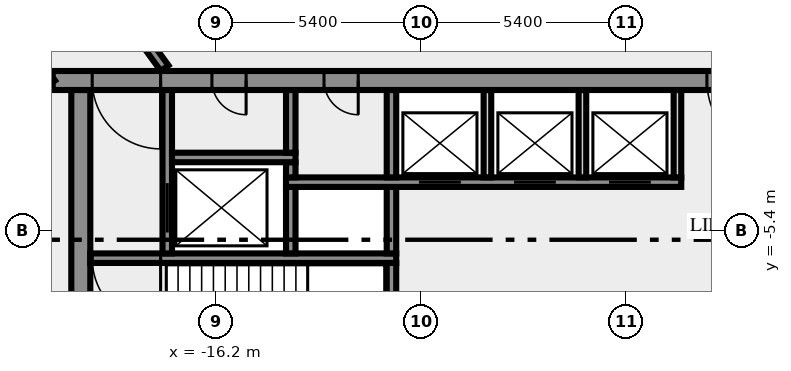
"""IFC4 building model, lengths in metres.
Left out: names, types, materials, properties, quantities, classifications, styles, units other than length and angle.
Written with IfcOpenShell. Run it as: python <this file> out.ifc"""

import sys

from ifc_helpers import new_model, si_unit, direction, frame, frame_2d, origin, place, context, subcontext, project, spatial, rectangle, extrude, element, fill, save


model = new_model("IFC4")
c1 = context("Model", 3, precision=1e-05, world=origin(), true_north=direction((0.0, 1.0)))
c2 = subcontext(c1, "Body", "Model", "MODEL_VIEW")
j1 = project(units=[si_unit("LENGTHUNIT", "METRE"), si_unit("PLANEANGLEUNIT", "RADIAN")], contexts=[c1])
p1 = place(None, origin())
s1 = spatial("IfcSite", under=j1, at=p1, CompositionType="ELEMENT")
p2 = place(p1, origin())
s2 = spatial("IfcBuilding", under=s1, at=p2, CompositionType="ELEMENT")
p3 = place(p2, frame((0.0, 0.0, 89.0)))
s3 = spatial("IfcBuildingStorey", under=s2, at=p3, CompositionType="ELEMENT", Elevation=89.0)
p4 = place(p3, frame((-19.75, -10.5, 0.0), z_axis=(0.0, 0.0, 1.0), x_axis=(0.0, 1.0, 0.0)))
e1 = element("IfcWall", 1, at=p4, inside=s3, PredefinedType="SHEAR", context=c2, shape_type="SweptSolid", body=[
    extrude(rectangle(XDim=8.8, YDim=0.5, at=frame_2d((4.4, 0.0))), origin(), (0.0, 0.0, 1.0), 3.65),
])
p5 = place(p3, frame((-11.575, -7.25, 0.0), z_axis=(0.0, 0.0, 1.0), x_axis=(0.0, 1.0, 0.0)))
e2 = element("IfcWall", 2, at=p5, inside=s3, PredefinedType="SHEAR", context=c2, shape_type="SweptSolid", body=[
    extrude(rectangle(XDim=1.0, YDim=0.25, at=frame_2d((0.5, 0.0))), origin(), (0.0, 0.0, 1.0), 3.65),
])
p6 = place(p3, frame((-11.45, -6.125, 0.0), z_axis=(0.0, 0.0, 1.0), x_axis=(-1.0, 0.0, 0.0)))
e3 = element("IfcWall", 3, at=p6, inside=s3, PredefinedType="SHEAR", context=c2, shape_type="SweptSolid", body=[
    extrude(rectangle(XDim=8.05, YDim=0.25, at=frame_2d((4.025, 0.0))), origin(), (0.0, 0.0, 1.0), 3.65),
])
p7 = place(p6, frame((6.2, 0.0, 0.0)))
e4 = element("IfcOpeningElement", 4, at=p7, cuts=e3, PredefinedType="OPENING", context=c2, shape_type="SweptSolid", body=[
    extrude(rectangle(XDim=1.8, YDim=2.1, at=frame_2d((0.9, 1.05))), frame((0.0, 0.135, 0.0), z_axis=(0.0, -1.0, 0.0), x_axis=(1.0, 0.0, 0.0)), (0.0, 0.0, 1.0), 0.27),
])
p8 = place(p3, frame((-17.475, -6.0, 0.0), z_axis=(0.0, 0.0, 1.0), x_axis=(0.0, 1.0, 0.0)))
e5 = element("IfcWall", 5, at=p8, inside=s3, PredefinedType="SHEAR", context=c2, shape_type="SweptSolid", body=[
    extrude(rectangle(XDim=4.3, YDim=0.25, at=frame_2d((2.15, 0.0))), origin(), (0.0, 0.0, 1.0), 3.65),
])
p9 = place(p8, frame((0.55, 0.0, 0.0)))
e6 = element("IfcOpeningElement", 6, at=p9, cuts=e5, PredefinedType="OPENING", context=c2, shape_type="SweptSolid", body=[
    extrude(rectangle(XDim=1.3, YDim=2.1, at=frame_2d((0.65, 1.05))), frame((0.0, 0.135, 0.0), z_axis=(0.0, -1.0, 0.0), x_axis=(1.0, 0.0, 0.0)), (0.0, 0.0, 1.0), 0.27),
])
for number, where, z_axis, x_axis in (
    (7, (-14.225, -6.0, 0.0), (0.0, 0.0, 1.0), (0.0, 1.0, 0.0)),
    (8, (-11.575, -6.0, 0.0), (0.0, 0.0, 1.0), (0.0, 1.0, 0.0)),
):
    element("IfcWall", number, at=place(p3, frame(where, z_axis=z_axis, x_axis=x_axis)), inside=s3, PredefinedType="SHEAR", context=c2, shape_type="SweptSolid", body=[
        extrude(rectangle(XDim=1.75, YDim=0.25, at=frame_2d((0.875, 0.0))), origin(), (0.0, 0.0, 1.0), 3.65),
    ])
p10 = place(p3, frame((-14.35, -4.125, 0.0), z_axis=(0.0, 0.0, 1.0), x_axis=(1.0, 0.0, 0.0)))
e9 = element("IfcWall", 9, at=p10, inside=s3, PredefinedType="SHEAR", context=c2, shape_type="SweptSolid", body=[
    extrude(rectangle(XDim=10.4, YDim=0.25, at=frame_2d((5.2, 0.0))), origin(), (0.0, 0.0, 1.0), 3.65),
])
p11 = place(p10, frame((3.5, 0.0, 0.0)))
e10 = element("IfcOpeningElement", 10, at=p11, cuts=e9, PredefinedType="OPENING", context=c2, shape_type="SweptSolid", body=[
    extrude(rectangle(XDim=1.1, YDim=2.1, at=frame_2d((0.55, 1.05))), frame((0.0, 0.135, 0.0), z_axis=(0.0, -1.0, 0.0), x_axis=(1.0, 0.0, 0.0)), (0.0, 0.0, 1.0), 0.27),
])
p12 = place(p10, frame((6.0, 0.0, 0.0)))
e11 = element("IfcOpeningElement", 11, at=p12, cuts=e9, PredefinedType="OPENING", context=c2, shape_type="SweptSolid", body=[
    extrude(rectangle(XDim=1.1, YDim=2.1, at=frame_2d((0.55, 1.05))), frame((0.0, 0.135, 0.0), z_axis=(0.0, -1.0, 0.0), x_axis=(1.0, 0.0, 0.0)), (0.0, 0.0, 1.0), 0.27),
])
p13 = place(p10, frame((8.5, 0.0, 0.0)))
e12 = element("IfcOpeningElement", 12, at=p13, cuts=e9, PredefinedType="OPENING", context=c2, shape_type="SweptSolid", body=[
    extrude(rectangle(XDim=1.1, YDim=2.1, at=frame_2d((0.55, 1.05))), frame((0.0, 0.135, 0.0), z_axis=(0.0, -1.0, 0.0), x_axis=(1.0, 0.0, 0.0)), (0.0, 0.0, 1.0), 0.27),
])
p14 = place(p3, frame((-14.225, -4.0, 0.0), z_axis=(0.0, 0.0, 1.0), x_axis=(0.0, 1.0, 0.0)))
e13 = element("IfcWall", 13, at=p14, inside=s3, PredefinedType="SHEAR", context=c2, shape_type="SweptSolid", body=[
    extrude(rectangle(XDim=0.4, YDim=0.25, at=frame_2d((0.2, 0.0))), origin(), (0.0, 0.0, 1.0), 3.65),
])
p15 = place(p3, frame((-11.575, -4.0, 0.0), z_axis=(0.0, 0.0, 1.0), x_axis=(0.0, 1.0, 0.0)))
e14 = element("IfcWall", 14, at=p15, inside=s3, PredefinedType="SHEAR", context=c2, shape_type="SweptSolid", body=[
    extrude(rectangle(XDim=2.3, YDim=0.25, at=frame_2d((1.15, 0.0))), origin(), (0.0, 0.0, 1.0), 3.65),
])
for number, where, z_axis, x_axis in (
    (15, (-9.05, -4.0, 0.0), (0.0, 0.0, 1.0), (0.0, 1.0, 0.0)),
    (16, (-6.55, -4.0, 0.0), (0.0, 0.0, 1.0), (0.0, 1.0, 0.0)),
    (17, (-4.05, -4.0, 0.0), (0.0, 0.0, 1.0), (0.0, 1.0, 0.0)),
):
    element("IfcWall", number, at=place(p3, frame(where, z_axis=z_axis, x_axis=x_axis)), inside=s3, PredefinedType="SOLIDWALL", context=c2, shape_type="SweptSolid", body=[
        extrude(rectangle(XDim=2.3, YDim=0.2, at=frame_2d((1.15, 0.0))), origin(), (0.0, 0.0, 1.0), 3.65),
    ])
p16 = place(p3, frame((-17.35, -3.475, 0.0), z_axis=(0.0, 0.0, 1.0), x_axis=(1.0, 0.0, 0.0)))
e18 = element("IfcWall", 18, at=p16, inside=s3, PredefinedType="SHEAR", context=c2, shape_type="SweptSolid", body=[
    extrude(rectangle(XDim=3.25, YDim=0.25, at=frame_2d((1.625, 0.0))), origin(), (0.0, 0.0, 1.0), 3.65),
])
p17 = place(p3, frame((-14.225, -3.35, 0.0), z_axis=(0.0, 0.0, 1.0), x_axis=(0.0, 1.0, 0.0)))
e19 = element("IfcWall", 19, at=p17, inside=s3, PredefinedType="SHEAR", context=c2, shape_type="SweptSolid", body=[
    extrude(rectangle(XDim=1.65, YDim=0.25, at=frame_2d((0.825, 0.0))), origin(), (0.0, 0.0, 1.0), 3.65),
])
p18 = place(p3, frame((20.49, -1.45, 0.0), z_axis=(0.0, 0.0, 1.0), x_axis=(-1.0, 0.0, 0.0)))
e20 = element("IfcWall", 20, at=p18, inside=s3, PredefinedType="SHEAR", context=c2, shape_type="SweptSolid", body=[
    extrude(rectangle(XDim=40.98, YDim=0.5, at=frame_2d((20.49, 0.0))), origin(), (0.0, 0.0, 1.0), 3.65),
])
p19 = place(p18, frame((38.14, 0.0, 0.0)))
e21 = element("IfcOpeningElement", 21, at=p19, cuts=e20, PredefinedType="OPENING", context=c2, shape_type="SweptSolid", body=[
    extrude(rectangle(XDim=1.8, YDim=2.1, at=frame_2d((0.9, 1.05))), frame((0.0, 0.26, 0.0), z_axis=(0.0, -1.0, 0.0), x_axis=(1.0, 0.0, 0.0)), (0.0, 0.0, 1.0), 0.52),
])
p20 = place(p18, frame((35.89, 0.0, 0.0)))
e22 = element("IfcOpeningElement", 22, at=p20, cuts=e20, PredefinedType="OPENING", context=c2, shape_type="SweptSolid", body=[
    extrude(rectangle(XDim=0.9, YDim=2.1, at=frame_2d((0.45, 1.05))), frame((0.0, 0.26, 0.0), z_axis=(0.0, -1.0, 0.0), x_axis=(1.0, 0.0, 0.0)), (0.0, 0.0, 1.0), 0.52),
])
p21 = place(p18, frame((32.94, 0.0, 0.0)))
e23 = element("IfcOpeningElement", 23, at=p21, cuts=e20, PredefinedType="OPENING", context=c2, shape_type="SweptSolid", body=[
    extrude(rectangle(XDim=0.9, YDim=2.1, at=frame_2d((0.45, 1.05))), frame((0.0, 0.26, 0.0), z_axis=(0.0, -1.0, 0.0), x_axis=(1.0, 0.0, 0.0)), (0.0, 0.0, 1.0), 0.52),
])
p22 = place(p18, frame((21.765, 0.0, 0.0)))
e24 = element("IfcOpeningElement", 24, at=p22, cuts=e20, PredefinedType="OPENING", context=c2, shape_type="SweptSolid", body=[
    extrude(rectangle(XDim=2.0, YDim=2.1, at=frame_2d((1.0, 1.05))), frame((0.0, 0.26, 0.0), z_axis=(0.0, -1.0, 0.0), x_axis=(1.0, 0.0, 0.0)), (0.0, 0.0, 1.0), 0.52),
])
p23 = place(p18, frame((7.14, 0.0, 0.0)))
e25 = element("IfcOpeningElement", 25, at=p23, cuts=e20, PredefinedType="OPENING", context=c2, shape_type="SweptSolid", body=[
    extrude(rectangle(XDim=0.9, YDim=2.1, at=frame_2d((0.45, 1.05))), frame((0.0, 0.26, 0.0), z_axis=(0.0, -1.0, 0.0), x_axis=(1.0, 0.0, 0.0)), (0.0, 0.0, 1.0), 0.52),
])
p24 = place(p18, frame((5.028, 0.0, 0.0)))
e26 = element("IfcOpeningElement", 26, at=p24, cuts=e20, PredefinedType="OPENING", context=c2, shape_type="SweptSolid", body=[
    extrude(rectangle(XDim=0.8, YDim=2.1, at=frame_2d((0.4, 1.05))), frame((0.0, 0.26, 0.0), z_axis=(0.0, -1.0, 0.0), x_axis=(1.0, 0.0, 0.0)), (0.0, 0.0, 1.0), 0.52),
])
p25 = place(p18, frame((3.452, 0.0, 0.0)))
e27 = element("IfcOpeningElement", 27, at=p25, cuts=e20, PredefinedType="OPENING", context=c2, shape_type="SweptSolid", body=[
    extrude(rectangle(XDim=0.8, YDim=2.1, at=frame_2d((0.4, 1.05))), frame((0.0, 0.26, 0.0), z_axis=(0.0, -1.0, 0.0), x_axis=(1.0, 0.0, 0.0)), (0.0, 0.0, 1.0), 0.52),
])
p26 = place(p18, frame((1.04, 0.0, 0.0)))
e28 = element("IfcOpeningElement", 28, at=p26, cuts=e20, PredefinedType="OPENING", context=c2, shape_type="SweptSolid", body=[
    extrude(rectangle(XDim=1.8, YDim=2.1, at=frame_2d((0.9, 1.05))), frame((0.0, 0.26, 0.0), z_axis=(0.0, -1.0, 0.0), x_axis=(1.0, 0.0, 0.0)), (0.0, 0.0, 1.0), 0.52),
])
p27 = place(p3, frame((-20.531, -1.523, 0.0), z_axis=(0.0, 0.0, 1.0), x_axis=(-0.587784522481, 0.809017524614, 0.0)))
e29 = element("IfcWall", 29, at=p27, inside=s3, PredefinedType="SOLIDWALL", context=c2, shape_type="SweptSolid", body=[
    extrude(rectangle(XDim=49.912, YDim=0.25, at=frame_2d((24.956, 0.0))), origin(), (0.0, 0.0, 1.0), 3.65),
])
p28 = place(p27, frame((0.533, 0.0, 0.0)))
e30 = element("IfcOpeningElement", 30, at=p28, cuts=e29, PredefinedType="OPENING", context=c2, shape_type="SweptSolid", body=[
    extrude(rectangle(XDim=0.9, YDim=2.1, at=frame_2d((0.45, 1.05))), frame((0.0, 0.135, 0.0), z_axis=(0.0, -1.0, 0.0), x_axis=(1.0, 0.0, 0.0)), (0.0, 0.0, 1.0), 0.27),
])
p29 = place(p27, frame((48.47, 0.0, 0.0)))
e31 = element("IfcOpeningElement", 31, at=p29, cuts=e29, PredefinedType="OPENING", context=c2, shape_type="SweptSolid", body=[
    extrude(rectangle(XDim=1.0, YDim=2.1, at=frame_2d((0.5, 1.05))), frame((0.0, 0.135, 0.0), z_axis=(0.0, -1.0, 0.0), x_axis=(1.0, 0.0, 0.0)), (0.0, 0.0, 1.0), 0.27),
])
p30 = place(p27, frame((17.365, 0.0, 0.0)))
e32 = element("IfcOpeningElement", 32, at=p30, cuts=e29, PredefinedType="OPENING", context=c2, shape_type="SweptSolid", body=[
    extrude(rectangle(XDim=1.8, YDim=2.1, at=frame_2d((0.9, 1.05))), frame((0.0, 0.135, 0.0), z_axis=(0.0, -1.0, 0.0), x_axis=(1.0, 0.0, 0.0)), (0.0, 0.0, 1.0), 0.27),
])
p31 = place(p27, frame((7.816, 0.0, 0.0)))
e33 = element("IfcOpeningElement", 33, at=p31, cuts=e29, PredefinedType="OPENING", context=c2, shape_type="SweptSolid", body=[
    extrude(rectangle(XDim=0.9, YDim=2.1, at=frame_2d((0.45, 1.05))), frame((0.0, 0.135, 0.0), z_axis=(0.0, -1.0, 0.0), x_axis=(1.0, 0.0, 0.0)), (0.0, 0.0, 1.0), 0.27),
])
p32 = place(p3, frame((-37.232, 25.972, 0.0), z_axis=(0.0, 0.0, 1.0), x_axis=(0.587786323093, -0.809016216391, 0.0)))
e34 = element("IfcWall", 34, at=p32, inside=s3, PredefinedType="SOLIDWALL", context=c2, shape_type="SweptSolid", body=[
    extrude(rectangle(XDim=33.493, YDim=0.25, at=frame_2d((16.747, 0.0))), origin(), (0.0, 0.0, 1.0), 3.65),
])
p33 = place(p32, frame((19.135, 0.0, 0.0)))
e35 = element("IfcOpeningElement", 35, at=p33, cuts=e34, PredefinedType="OPENING", context=c2, shape_type="SweptSolid", body=[
    extrude(rectangle(XDim=0.9, YDim=2.1, at=frame_2d((0.45, 1.05))), frame((0.0, 0.135, 0.0), z_axis=(0.0, -1.0, 0.0), x_axis=(1.0, 0.0, 0.0)), (0.0, 0.0, 1.0), 0.27),
])
p34 = place(p32, frame((7.137, 0.0, 0.0)))
e36 = element("IfcOpeningElement", 36, at=p34, cuts=e34, PredefinedType="OPENING", context=c2, shape_type="SweptSolid", body=[
    extrude(rectangle(XDim=1.8, YDim=2.1, at=frame_2d((0.9, 1.05))), frame((0.0, 0.135, 0.0), z_axis=(0.0, -1.0, 0.0), x_axis=(1.0, 0.0, 0.0)), (0.0, 0.0, 1.0), 0.27),
])
p35 = place(p32, frame((16.435, 0.0, 0.0)))
e37 = element("IfcOpeningElement", 37, at=p35, cuts=e34, PredefinedType="OPENING", context=c2, shape_type="SweptSolid", body=[
    extrude(rectangle(XDim=0.9, YDim=2.1, at=frame_2d((0.45, 1.05))), frame((0.0, 0.135, 0.0), z_axis=(0.0, -1.0, 0.0), x_axis=(1.0, 0.0, 0.0)), (0.0, 0.0, 1.0), 0.27),
])
p36 = place(p7, origin())
e38 = element("IfcDoor", 38, at=p36, inside=s3, OperationType="DOUBLE_DOOR_SINGLE_SWING", PredefinedType="DOOR", context=c2, shape_type="SweptSolid", body=[
    extrude(rectangle(XDim=1.8, YDim=2.1, at=frame_2d((0.9, 1.05))), frame((0.0, 0.025, 0.0), z_axis=(0.0, -1.0, 0.0), x_axis=(1.0, 0.0, 0.0)), (0.0, 0.0, 1.0), 0.05),
])
fill(e4, e38)
p37 = place(p9, origin())
e39 = element("IfcDoor", 39, at=p37, inside=s3, OperationType="DOUBLE_DOOR_SLIDING", PredefinedType="DOOR", context=c2, shape_type="SweptSolid", body=[
    extrude(rectangle(XDim=1.3, YDim=2.1, at=frame_2d((0.65, 1.05))), frame((0.0, 0.025, 0.0), z_axis=(0.0, -1.0, 0.0), x_axis=(1.0, 0.0, 0.0)), (0.0, 0.0, 1.0), 0.05),
])
fill(e6, e39)
p38 = place(p11, origin())
e40 = element("IfcDoor", 40, at=p38, inside=s3, OperationType="DOUBLE_DOOR_SLIDING", PredefinedType="DOOR", context=c2, shape_type="SweptSolid", body=[
    extrude(rectangle(XDim=1.1, YDim=2.1, at=frame_2d((0.55, 1.05))), frame((0.0, 0.025, 0.0), z_axis=(0.0, -1.0, 0.0), x_axis=(1.0, 0.0, 0.0)), (0.0, 0.0, 1.0), 0.05),
])
fill(e10, e40)
p39 = place(p12, origin())
e41 = element("IfcDoor", 41, at=p39, inside=s3, OperationType="DOUBLE_DOOR_SLIDING", PredefinedType="DOOR", context=c2, shape_type="SweptSolid", body=[
    extrude(rectangle(XDim=1.1, YDim=2.1, at=frame_2d((0.55, 1.05))), frame((0.0, 0.025, 0.0), z_axis=(0.0, -1.0, 0.0), x_axis=(1.0, 0.0, 0.0)), (0.0, 0.0, 1.0), 0.05),
])
fill(e11, e41)
p40 = place(p13, origin())
e42 = element("IfcDoor", 42, at=p40, inside=s3, OperationType="DOUBLE_DOOR_SLIDING", PredefinedType="DOOR", context=c2, shape_type="SweptSolid", body=[
    extrude(rectangle(XDim=1.1, YDim=2.1, at=frame_2d((0.55, 1.05))), frame((0.0, 0.025, 0.0), z_axis=(0.0, -1.0, 0.0), x_axis=(1.0, 0.0, 0.0)), (0.0, 0.0, 1.0), 0.05),
])
fill(e12, e42)
p41 = place(p19, origin())
e43 = element("IfcDoor", 43, at=p41, inside=s3, OperationType="DOUBLE_DOOR_SINGLE_SWING", PredefinedType="DOOR", context=c2, shape_type="SweptSolid", body=[
    extrude(rectangle(XDim=1.8, YDim=2.1, at=frame_2d((0.9, 1.05))), frame((0.0, 0.025, 0.0), z_axis=(0.0, -1.0, 0.0), x_axis=(1.0, 0.0, 0.0)), (0.0, 0.0, 1.0), 0.05),
])
fill(e21, e43)
p42 = place(p20, origin())
e44 = element("IfcDoor", 44, at=p42, inside=s3, OperationType="SINGLE_SWING_RIGHT", PredefinedType="DOOR", context=c2, shape_type="SweptSolid", body=[
    extrude(rectangle(XDim=0.9, YDim=2.1, at=frame_2d((0.45, 1.05))), frame((0.0, 0.025, 0.0), z_axis=(0.0, -1.0, 0.0), x_axis=(1.0, 0.0, 0.0)), (0.0, 0.0, 1.0), 0.05),
])
fill(e22, e44)
p43 = place(p21, origin())
e45 = element("IfcDoor", 45, at=p43, inside=s3, OperationType="SINGLE_SWING_RIGHT", PredefinedType="DOOR", context=c2, shape_type="SweptSolid", body=[
    extrude(rectangle(XDim=0.9, YDim=2.1, at=frame_2d((0.45, 1.05))), frame((0.0, 0.025, 0.0), z_axis=(0.0, -1.0, 0.0), x_axis=(1.0, 0.0, 0.0)), (0.0, 0.0, 1.0), 0.05),
])
fill(e23, e45)
p44 = place(p22, origin())
e46 = element("IfcDoor", 46, at=p44, inside=s3, OperationType="DOUBLE_DOOR_SINGLE_SWING", PredefinedType="DOOR", context=c2, shape_type="SweptSolid", body=[
    extrude(rectangle(XDim=2.0, YDim=2.1, at=frame_2d((1.0, 1.05))), frame((0.0, 0.025, 0.0), z_axis=(0.0, -1.0, 0.0), x_axis=(1.0, 0.0, 0.0)), (0.0, 0.0, 1.0), 0.05),
])
fill(e24, e46)
save(model, sys.argv[1])
